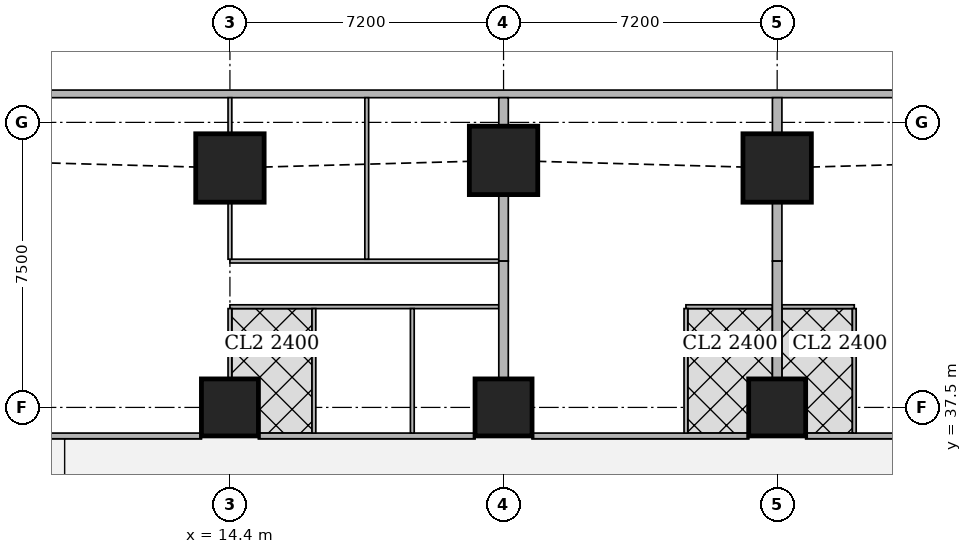
"""IFC4 building model, lengths in metres.
Left out: names, types, materials, properties, quantities, classifications, styles, units other than length and angle.
Written with IfcOpenShell. Run it as: python <this file> out.ifc"""

import sys

from ifc_helpers import new_model, si_unit, direction, frame, frame_2d, origin, origin_2d, place, context, subcontext, project, spatial, rectangle, extrude, element, fill, save


model = new_model("IFC4")
c1 = context("Model", 3, precision=1e-05, world=origin(), true_north=direction((0.0, 1.0)))
c2 = subcontext(c1, "Body", "Model", "MODEL_VIEW")
j1 = project(units=[si_unit("LENGTHUNIT", "METRE"), si_unit("PLANEANGLEUNIT", "RADIAN")], contexts=[c1])
p1 = place(None, origin())
s1 = spatial("IfcSite", under=j1, at=p1, CompositionType="ELEMENT")
p2 = place(p1, origin())
s2 = spatial("IfcBuilding", under=s1, at=p2, CompositionType="ELEMENT")
p3 = place(p2, frame((0.0, 0.0, 169.55)))
s3 = spatial("IfcBuildingStorey", under=s2, at=p3, CompositionType="ELEMENT", Elevation=169.55)
for number, where, z_axis, x_axis in (
    (1, (14.4, 37.5, 0.0), (0.0, 0.0, 1.0), (1.0, 0.0, 0.0)),
    (2, (21.6, 37.5, 0.0), (0.0, 0.0, 1.0), (1.0, 0.0, 0.0)),
    (3, (28.8, 37.5, 0.0), (0.0, 0.0, 1.0), (1.0, 0.0, 0.0)),
):
    element("IfcColumn", number, at=place(p3, frame(where, z_axis=z_axis, x_axis=x_axis)), inside=s3, PredefinedType="COLUMN", context=c2, shape_type="SweptSolid", body=[
        extrude(rectangle(XDim=1.5, YDim=1.5, at=origin_2d()), origin(), (0.0, 0.0, 1.0), 3.75),
    ])
for number, where, z_axis, x_axis in (
    (4, (14.4, 43.8, 0.0), (0.0, 0.0, 1.0), (1.0, 0.0, 0.0)),
    (5, (21.6, 44.0, 0.0), (0.0, 0.0, 1.0), (1.0, 0.0, 0.0)),
    (6, (28.8, 43.8, 0.0), (0.0, 0.0, 1.0), (1.0, 0.0, 0.0)),
):
    element("IfcColumn", number, at=place(p3, frame(where, z_axis=z_axis, x_axis=x_axis)), inside=s3, PredefinedType="COLUMN", context=c2, shape_type="SweptSolid", body=[
        extrude(rectangle(XDim=1.8, YDim=1.8, at=origin_2d()), origin(), (0.0, 0.0, 1.0), 3.75),
    ])
p4 = place(p3, frame((40.106, 45.75, 0.0), z_axis=(0.0, 0.0, 1.0), x_axis=(-1.0, 0.0, 0.0)))
e7 = element("IfcWall", 7, at=p4, inside=s3, PredefinedType="SOLIDWALL", context=c2, shape_type="SweptSolid", body=[
    extrude(rectangle(XDim=37.943, YDim=0.2, at=frame_2d((18.971, 0.0))), origin(), (0.0, 0.0, 1.0), 3.5),
])
p5 = place(p4, frame((8.606, 0.0, 0.9)))
e8 = element("IfcOpeningElement", 8, at=p5, cuts=e7, PredefinedType="OPENING", context=c2, shape_type="SweptSolid", body=[
    extrude(rectangle(XDim=1.8, YDim=1.5, at=frame_2d((0.9, 0.75))), frame((0.0, 0.11, 0.0), z_axis=(0.0, -1.0, 0.0), x_axis=(1.0, 0.0, 0.0)), (0.0, 0.0, 1.0), 0.22),
])
p6 = place(p4, frame((12.206, 0.0, 0.9)))
e9 = element("IfcOpeningElement", 9, at=p6, cuts=e7, PredefinedType="OPENING", context=c2, shape_type="SweptSolid", body=[
    extrude(rectangle(XDim=1.8, YDim=1.5, at=frame_2d((0.9, 0.75))), frame((0.0, 0.11, 0.0), z_axis=(0.0, -1.0, 0.0), x_axis=(1.0, 0.0, 0.0)), (0.0, 0.0, 1.0), 0.22),
])
p7 = place(p4, frame((15.806, 0.0, 0.9)))
e10 = element("IfcOpeningElement", 10, at=p7, cuts=e7, PredefinedType="OPENING", context=c2, shape_type="SweptSolid", body=[
    extrude(rectangle(XDim=1.8, YDim=1.5, at=frame_2d((0.9, 0.75))), frame((0.0, 0.11, 0.0), z_axis=(0.0, -1.0, 0.0), x_axis=(1.0, 0.0, 0.0)), (0.0, 0.0, 1.0), 0.22),
])
p8 = place(p4, frame((19.406, 0.0, 0.9)))
e11 = element("IfcOpeningElement", 11, at=p8, cuts=e7, PredefinedType="OPENING", context=c2, shape_type="SweptSolid", body=[
    extrude(rectangle(XDim=1.8, YDim=1.5, at=frame_2d((0.9, 0.75))), frame((0.0, 0.11, 0.0), z_axis=(0.0, -1.0, 0.0), x_axis=(1.0, 0.0, 0.0)), (0.0, 0.0, 1.0), 0.22),
])
p9 = place(p4, frame((23.006, 0.0, 0.9)))
e12 = element("IfcOpeningElement", 12, at=p9, cuts=e7, PredefinedType="OPENING", context=c2, shape_type="SweptSolid", body=[
    extrude(rectangle(XDim=1.8, YDim=1.5, at=frame_2d((0.9, 0.75))), frame((0.0, 0.11, 0.0), z_axis=(0.0, -1.0, 0.0), x_axis=(1.0, 0.0, 0.0)), (0.0, 0.0, 1.0), 0.22),
])
p10 = place(p4, frame((26.606, 0.0, 0.9)))
e13 = element("IfcOpeningElement", 13, at=p10, cuts=e7, PredefinedType="OPENING", context=c2, shape_type="SweptSolid", body=[
    extrude(rectangle(XDim=1.8, YDim=1.5, at=frame_2d((0.9, 0.75))), frame((0.0, 0.11, 0.0), z_axis=(0.0, -1.0, 0.0), x_axis=(1.0, 0.0, 0.0)), (0.0, 0.0, 1.0), 0.22),
])
p11 = place(p3, frame((8.1, 36.75, 0.0), z_axis=(0.0, 0.0, 1.0), x_axis=(1.0, 0.0, 0.0)))
e14 = element("IfcWall", 14, at=p11, inside=s3, PredefinedType="SOLIDWALL", context=c2, shape_type="SweptSolid", body=[
    extrude(rectangle(XDim=5.549, YDim=0.15, at=frame_2d((2.774, 0.0))), origin(), (0.0, 0.0, 1.0), 3.5),
])
p12 = place(p11, frame((2.725, 0.0, 0.0)))
e15 = element("IfcOpeningElement", 15, at=p12, cuts=e14, PredefinedType="OPENING", context=c2, shape_type="SweptSolid", body=[
    extrude(rectangle(XDim=1.0, YDim=2.1, at=frame_2d((0.5, 1.05))), frame((0.0, 0.085, 0.0), z_axis=(0.0, -1.0, 0.0), x_axis=(1.0, 0.0, 0.0)), (0.0, 0.0, 1.0), 0.17),
])
p13 = place(p3, frame((15.151, 36.75, 0.0), z_axis=(0.0, 0.0, 1.0), x_axis=(1.0, 0.0, 0.0)))
e16 = element("IfcWall", 16, at=p13, inside=s3, PredefinedType="SOLIDWALL", context=c2, shape_type="SweptSolid", body=[
    extrude(rectangle(XDim=5.698, YDim=0.15, at=frame_2d((2.849, 0.0))), origin(), (0.0, 0.0, 1.0), 3.5),
])
p14 = place(p3, frame((22.351, 36.75, 0.0), z_axis=(0.0, 0.0, 1.0), x_axis=(1.0, 0.0, 0.0)))
e17 = element("IfcWall", 17, at=p14, inside=s3, PredefinedType="SOLIDWALL", context=c2, shape_type="SweptSolid", body=[
    extrude(rectangle(XDim=5.698, YDim=0.15, at=frame_2d((2.849, 0.0))), origin(), (0.0, 0.0, 1.0), 3.5),
])
p15 = place(p14, frame((1.149, 0.0, 0.0)))
e18 = element("IfcOpeningElement", 18, at=p15, cuts=e17, PredefinedType="OPENING", context=c2, shape_type="SweptSolid", body=[
    extrude(rectangle(XDim=1.0, YDim=2.1, at=frame_2d((0.5, 1.05))), frame((0.0, 0.085, 0.0), z_axis=(0.0, -1.0, 0.0), x_axis=(1.0, 0.0, 0.0)), (0.0, 0.0, 1.0), 0.17),
])
p16 = place(p3, frame((29.551, 36.75, 0.0), z_axis=(0.0, 0.0, 1.0), x_axis=(1.0, 0.0, 0.0)))
e19 = element("IfcWall", 19, at=p16, inside=s3, PredefinedType="SOLIDWALL", context=c2, shape_type="SweptSolid", body=[
    extrude(rectangle(XDim=5.422, YDim=0.15, at=frame_2d((2.711, 0.0))), origin(), (0.0, 0.0, 1.0), 3.5),
])
p17 = place(p16, frame((2.895, 0.0, 0.0)))
e20 = element("IfcOpeningElement", 20, at=p17, cuts=e19, PredefinedType="OPENING", context=c2, shape_type="SweptSolid", body=[
    extrude(rectangle(XDim=1.0, YDim=2.1, at=frame_2d((0.5, 1.05))), frame((0.0, 0.085, 0.0), z_axis=(0.0, -1.0, 0.0), x_axis=(1.0, 0.0, 0.0)), (0.0, 0.0, 1.0), 0.17),
])
p18 = place(p3, frame((14.4, 41.35, 0.0), z_axis=(0.0, 0.0, 1.0), x_axis=(1.0, 0.0, 0.0)))
e21 = element("IfcWall", 21, at=p18, inside=s3, PredefinedType="PARTITIONING", context=c2, shape_type="SweptSolid", body=[
    extrude(rectangle(XDim=7.075, YDim=0.1, at=frame_2d((3.538, 0.0))), origin(), (0.0, 0.0, 1.0), 3.5),
])
p19 = place(p18, frame((0.2, 0.0, 0.0)))
e22 = element("IfcOpeningElement", 22, at=p19, cuts=e21, PredefinedType="OPENING", context=c2, shape_type="SweptSolid", body=[
    extrude(rectangle(XDim=0.9, YDim=2.1, at=frame_2d((0.45, 1.05))), frame((0.0, 0.06, 0.0), z_axis=(0.0, -1.0, 0.0), x_axis=(1.0, 0.0, 0.0)), (0.0, 0.0, 1.0), 0.12),
])
p20 = place(p18, frame((3.8, 0.0, 0.0)))
e23 = element("IfcOpeningElement", 23, at=p20, cuts=e21, PredefinedType="OPENING", context=c2, shape_type="SweptSolid", body=[
    extrude(rectangle(XDim=0.9, YDim=2.1, at=frame_2d((0.45, 1.05))), frame((0.0, 0.06, 0.0), z_axis=(0.0, -1.0, 0.0), x_axis=(1.0, 0.0, 0.0)), (0.0, 0.0, 1.0), 0.12),
])
p21 = place(p3, frame((14.4, 40.15, 0.0), z_axis=(0.0, 0.0, 1.0), x_axis=(1.0, 0.0, 0.0)))
e24 = element("IfcWall", 24, at=p21, inside=s3, PredefinedType="PARTITIONING", context=c2, shape_type="SweptSolid", body=[
    extrude(rectangle(XDim=7.075, YDim=0.1, at=frame_2d((3.538, 0.0))), origin(), (0.0, 0.0, 1.0), 3.5),
])
p22 = place(p21, frame((0.655, 0.0, 0.0)))
e25 = element("IfcOpeningElement", 25, at=p22, cuts=e24, PredefinedType="OPENING", context=c2, shape_type="SweptSolid", body=[
    extrude(rectangle(XDim=0.9, YDim=2.1, at=frame_2d((0.45, 1.05))), frame((0.0, 0.06, 0.0), z_axis=(0.0, -1.0, 0.0), x_axis=(1.0, 0.0, 0.0)), (0.0, 0.0, 1.0), 0.12),
])
p23 = place(p21, frame((5.55, 0.0, 0.0)))
e26 = element("IfcOpeningElement", 26, at=p23, cuts=e24, PredefinedType="OPENING", context=c2, shape_type="SweptSolid", body=[
    extrude(rectangle(XDim=0.9, YDim=2.1, at=frame_2d((0.45, 1.05))), frame((0.0, 0.06, 0.0), z_axis=(0.0, -1.0, 0.0), x_axis=(1.0, 0.0, 0.0)), (0.0, 0.0, 1.0), 0.12),
])
p24 = place(p21, frame((3.054, 0.0, 0.0)))
e27 = element("IfcOpeningElement", 27, at=p24, cuts=e24, PredefinedType="OPENING", context=c2, shape_type="SweptSolid", body=[
    extrude(rectangle(XDim=0.9, YDim=2.1, at=frame_2d((0.45, 1.05))), frame((0.0, 0.06, 0.0), z_axis=(0.0, -1.0, 0.0), x_axis=(1.0, 0.0, 0.0)), (0.0, 0.0, 1.0), 0.12),
])
p25 = place(p3, frame((14.4, 41.4, 0.0), z_axis=(0.0, 0.0, 1.0), x_axis=(0.0, 1.0, 0.0)))
e28 = element("IfcWall", 28, at=p25, inside=s3, PredefinedType="PARTITIONING", context=c2, shape_type="SweptSolid", body=[
    extrude(rectangle(XDim=1.499, YDim=0.1, at=frame_2d((0.75, 0.0))), origin(), (0.0, 0.0, 1.0), 3.5),
])
p26 = place(p3, frame((14.4, 44.701, 0.0), z_axis=(0.0, 0.0, 1.0), x_axis=(0.0, 1.0, 0.0)))
e29 = element("IfcWall", 29, at=p26, inside=s3, PredefinedType="PARTITIONING", context=c2, shape_type="SweptSolid", body=[
    extrude(rectangle(XDim=0.949, YDim=0.1, at=frame_2d((0.475, 0.0))), origin(), (0.0, 0.0, 1.0), 3.5),
])
p27 = place(p3, frame((18.0, 41.4, 0.0), z_axis=(0.0, 0.0, 1.0), x_axis=(0.0, 1.0, 0.0)))
e30 = element("IfcWall", 30, at=p27, inside=s3, PredefinedType="PARTITIONING", context=c2, shape_type="SweptSolid", body=[
    extrude(rectangle(XDim=4.25, YDim=0.1, at=frame_2d((2.125, 0.0))), origin(), (0.0, 0.0, 1.0), 2.1),
])
p28 = place(p3, frame((14.4, 38.251, 0.0), z_axis=(0.0, 0.0, 1.0), x_axis=(0.0, 1.0, 0.0)))
e31 = element("IfcWall", 31, at=p28, inside=s3, PredefinedType="PARTITIONING", context=c2, shape_type="SweptSolid", body=[
    extrude(rectangle(XDim=1.849, YDim=0.1, at=frame_2d((0.925, 0.0))), origin(), (0.0, 0.0, 1.0), 3.5),
])
for number, where, z_axis, x_axis in (
    (32, (19.199, 36.825, 0.0), (0.0, 0.0, 1.0), (0.0, 1.0, 0.0)),
    (33, (16.61, 36.825, 0.0), (0.0, 0.0, 1.0), (0.0, 1.0, 0.0)),
):
    element("IfcWall", number, at=place(p3, frame(where, z_axis=z_axis, x_axis=x_axis)), inside=s3, PredefinedType="PARTITIONING", context=c2, shape_type="SweptSolid", body=[
        extrude(rectangle(XDim=3.275, YDim=0.1, at=frame_2d((1.638, 0.0))), origin(), (0.0, 0.0, 1.0), 3.5),
    ])
p29 = place(p3, frame((26.399, 40.15, 0.0), z_axis=(0.0, 0.0, 1.0), x_axis=(1.0, 0.0, 0.0)))
e34 = element("IfcWall", 34, at=p29, inside=s3, PredefinedType="PARTITIONING", context=c2, shape_type="SweptSolid", body=[
    extrude(rectangle(XDim=2.276, YDim=0.1, at=frame_2d((1.138, 0.0))), origin(), (0.0, 0.0, 1.0), 3.5),
])
p30 = place(p29, frame((0.75, 0.0, 0.0)))
e35 = element("IfcOpeningElement", 35, at=p30, cuts=e34, PredefinedType="OPENING", context=c2, shape_type="SweptSolid", body=[
    extrude(rectangle(XDim=0.9, YDim=2.1, at=frame_2d((0.45, 1.05))), frame((0.0, 0.06, 0.0), z_axis=(0.0, -1.0, 0.0), x_axis=(1.0, 0.0, 0.0)), (0.0, 0.0, 1.0), 0.12),
])
p31 = place(p3, frame((26.399, 36.825, 0.0), z_axis=(0.0, 0.0, 1.0), x_axis=(0.0, 1.0, 0.0)))
e36 = element("IfcWall", 36, at=p31, inside=s3, PredefinedType="PARTITIONING", context=c2, shape_type="SweptSolid", body=[
    extrude(rectangle(XDim=3.275, YDim=0.1, at=frame_2d((1.638, 0.0))), origin(), (0.0, 0.0, 1.0), 3.5),
])
p32 = place(p3, frame((21.6, 41.35, 0.0), z_axis=(0.0, 0.0, 1.0), x_axis=(0.0, 1.0, 0.0)))
e37 = element("IfcWall", 37, at=p32, inside=s3, PredefinedType="SOLIDWALL", context=c2, shape_type="SweptSolid", body=[
    extrude(rectangle(XDim=1.749, YDim=0.25, at=frame_2d((0.875, 0.0))), origin(), (0.0, 0.0, 1.0), 2.1),
])
p33 = place(p3, frame((21.6, 44.901, 0.0), z_axis=(0.0, 0.0, 1.0), x_axis=(0.0, 1.0, 0.0)))
e38 = element("IfcWall", 38, at=p33, inside=s3, PredefinedType="SOLIDWALL", context=c2, shape_type="SweptSolid", body=[
    extrude(rectangle(XDim=0.749, YDim=0.25, at=frame_2d((0.375, 0.0))), origin(), (0.0, 0.0, 1.0), 2.1),
])
p34 = place(p3, frame((21.6, 38.251, 0.0), z_axis=(0.0, 0.0, 1.0), x_axis=(0.0, 1.0, 0.0)))
e39 = element("IfcWall", 39, at=p34, inside=s3, PredefinedType="SOLIDWALL", context=c2, shape_type="SweptSolid", body=[
    extrude(rectangle(XDim=3.099, YDim=0.25, at=frame_2d((1.55, 0.0))), origin(), (0.0, 0.0, 1.0), 3.5),
])
p35 = place(p3, frame((28.925, 40.15, 0.0), z_axis=(0.0, 0.0, 1.0), x_axis=(1.0, 0.0, 0.0)))
e40 = element("IfcWall", 40, at=p35, inside=s3, PredefinedType="PARTITIONING", context=c2, shape_type="SweptSolid", body=[
    extrude(rectangle(XDim=1.904, YDim=0.1, at=frame_2d((0.952, 0.0))), origin(), (0.0, 0.0, 1.0), 3.5),
])
p36 = place(p35, frame((0.425, 0.0, 0.0)))
e41 = element("IfcOpeningElement", 41, at=p36, cuts=e40, PredefinedType="OPENING", context=c2, shape_type="SweptSolid", body=[
    extrude(rectangle(XDim=0.9, YDim=2.1, at=frame_2d((0.45, 1.05))), frame((0.0, 0.06, 0.0), z_axis=(0.0, -1.0, 0.0), x_axis=(1.0, 0.0, 0.0)), (0.0, 0.0, 1.0), 0.12),
])
p37 = place(p3, frame((30.829, 36.825, 0.0), z_axis=(0.0, 0.0, 1.0), x_axis=(0.0, 1.0, 0.0)))
e42 = element("IfcWall", 42, at=p37, inside=s3, PredefinedType="PARTITIONING", context=c2, shape_type="SweptSolid", body=[
    extrude(rectangle(XDim=3.275, YDim=0.1, at=frame_2d((1.638, 0.0))), origin(), (0.0, 0.0, 1.0), 3.5),
])
p38 = place(p3, frame((28.8, 41.35, 0.0), z_axis=(0.0, 0.0, 1.0), x_axis=(0.0, 1.0, 0.0)))
e43 = element("IfcWall", 43, at=p38, inside=s3, PredefinedType="SOLIDWALL", context=c2, shape_type="SweptSolid", body=[
    extrude(rectangle(XDim=1.549, YDim=0.25, at=frame_2d((0.774, 0.0))), origin(), (0.0, 0.0, 1.0), 2.1),
])
p39 = place(p3, frame((28.8, 44.701, 0.0), z_axis=(0.0, 0.0, 1.0), x_axis=(0.0, 1.0, 0.0)))
e44 = element("IfcWall", 44, at=p39, inside=s3, PredefinedType="SOLIDWALL", context=c2, shape_type="SweptSolid", body=[
    extrude(rectangle(XDim=0.949, YDim=0.25, at=frame_2d((0.475, 0.0))), origin(), (0.0, 0.0, 1.0), 2.1),
])
p40 = place(p3, frame((28.8, 38.251, 0.0), z_axis=(0.0, 0.0, 1.0), x_axis=(0.0, 1.0, 0.0)))
e45 = element("IfcWall", 45, at=p40, inside=s3, PredefinedType="SOLIDWALL", context=c2, shape_type="SweptSolid", body=[
    extrude(rectangle(XDim=3.099, YDim=0.25, at=frame_2d((1.55, 0.0))), origin(), (0.0, 0.0, 1.0), 3.5),
])
p41 = place(p5, origin())
e46 = element("IfcWindow", 46, at=p41, inside=s3, PartitioningType="SINGLE_PANEL", PredefinedType="WINDOW", context=c2, shape_type="SweptSolid", body=[
    extrude(rectangle(XDim=1.8, YDim=1.5, at=frame_2d((0.9, 0.75))), frame((0.0, 0.03, 0.0), z_axis=(0.0, -1.0, 0.0), x_axis=(1.0, 0.0, 0.0)), (0.0, 0.0, 1.0), 0.06),
])
fill(e8, e46)
p42 = place(p6, origin())
e47 = element("IfcWindow", 47, at=p42, inside=s3, PartitioningType="SINGLE_PANEL", PredefinedType="WINDOW", context=c2, shape_type="SweptSolid", body=[
    extrude(rectangle(XDim=1.8, YDim=1.5, at=frame_2d((0.9, 0.75))), frame((0.0, 0.03, 0.0), z_axis=(0.0, -1.0, 0.0), x_axis=(1.0, 0.0, 0.0)), (0.0, 0.0, 1.0), 0.06),
])
fill(e9, e47)
p43 = place(p7, origin())
e48 = element("IfcWindow", 48, at=p43, inside=s3, PartitioningType="SINGLE_PANEL", PredefinedType="WINDOW", context=c2, shape_type="SweptSolid", body=[
    extrude(rectangle(XDim=1.8, YDim=1.5, at=frame_2d((0.9, 0.75))), frame((0.0, 0.03, 0.0), z_axis=(0.0, -1.0, 0.0), x_axis=(1.0, 0.0, 0.0)), (0.0, 0.0, 1.0), 0.06),
])
fill(e10, e48)
p44 = place(p8, origin())
e49 = element("IfcWindow", 49, at=p44, inside=s3, PartitioningType="SINGLE_PANEL", PredefinedType="WINDOW", context=c2, shape_type="SweptSolid", body=[
    extrude(rectangle(XDim=1.8, YDim=1.5, at=frame_2d((0.9, 0.75))), frame((0.0, 0.03, 0.0), z_axis=(0.0, -1.0, 0.0), x_axis=(1.0, 0.0, 0.0)), (0.0, 0.0, 1.0), 0.06),
])
fill(e11, e49)
p45 = place(p9, origin())
e50 = element("IfcWindow", 50, at=p45, inside=s3, PartitioningType="SINGLE_PANEL", PredefinedType="WINDOW", context=c2, shape_type="SweptSolid", body=[
    extrude(rectangle(XDim=1.8, YDim=1.5, at=frame_2d((0.9, 0.75))), frame((0.0, 0.03, 0.0), z_axis=(0.0, -1.0, 0.0), x_axis=(1.0, 0.0, 0.0)), (0.0, 0.0, 1.0), 0.06),
])
fill(e12, e50)
p46 = place(p10, origin())
e51 = element("IfcWindow", 51, at=p46, inside=s3, PartitioningType="SINGLE_PANEL", PredefinedType="WINDOW", context=c2, shape_type="SweptSolid", body=[
    extrude(rectangle(XDim=1.8, YDim=1.5, at=frame_2d((0.9, 0.75))), frame((0.0, 0.03, 0.0), z_axis=(0.0, -1.0, 0.0), x_axis=(1.0, 0.0, 0.0)), (0.0, 0.0, 1.0), 0.06),
])
fill(e13, e51)
p47 = place(p19, origin())
e52 = element("IfcDoor", 52, at=p47, inside=s3, OperationType="SINGLE_SWING_LEFT", PredefinedType="DOOR", context=c2, shape_type="SweptSolid", body=[
    extrude(rectangle(XDim=0.9, YDim=2.1, at=frame_2d((0.45, 1.05))), frame((0.0, 0.025, 0.0), z_axis=(0.0, -1.0, 0.0), x_axis=(1.0, 0.0, 0.0)), (0.0, 0.0, 1.0), 0.05),
])
fill(e22, e52)
p48 = place(p20, origin())
e53 = element("IfcDoor", 53, at=p48, inside=s3, OperationType="SINGLE_SWING_LEFT", PredefinedType="DOOR", context=c2, shape_type="SweptSolid", body=[
    extrude(rectangle(XDim=0.9, YDim=2.1, at=frame_2d((0.45, 1.05))), frame((0.0, 0.025, 0.0), z_axis=(0.0, -1.0, 0.0), x_axis=(1.0, 0.0, 0.0)), (0.0, 0.0, 1.0), 0.05),
])
fill(e23, e53)
p49 = place(p22, origin())
e54 = element("IfcDoor", 54, at=p49, inside=s3, OperationType="SINGLE_SWING_RIGHT", PredefinedType="DOOR", context=c2, shape_type="SweptSolid", body=[
    extrude(rectangle(XDim=0.9, YDim=2.1, at=frame_2d((0.45, 1.05))), frame((0.0, 0.025, 0.0), z_axis=(0.0, -1.0, 0.0), x_axis=(1.0, 0.0, 0.0)), (0.0, 0.0, 1.0), 0.05),
])
fill(e25, e54)
p50 = place(p23, origin())
e55 = element("IfcDoor", 55, at=p50, inside=s3, OperationType="SINGLE_SWING_LEFT", PredefinedType="DOOR", context=c2, shape_type="SweptSolid", body=[
    extrude(rectangle(XDim=0.9, YDim=2.1, at=frame_2d((0.45, 1.05))), frame((0.0, 0.025, 0.0), z_axis=(0.0, -1.0, 0.0), x_axis=(1.0, 0.0, 0.0)), (0.0, 0.0, 1.0), 0.05),
])
fill(e26, e55)
p51 = place(p24, origin())
e56 = element("IfcDoor", 56, at=p51, inside=s3, OperationType="SINGLE_SWING_LEFT", PredefinedType="DOOR", context=c2, shape_type="SweptSolid", body=[
    extrude(rectangle(XDim=0.9, YDim=2.1, at=frame_2d((0.45, 1.05))), frame((0.0, 0.025, 0.0), z_axis=(0.0, -1.0, 0.0), x_axis=(1.0, 0.0, 0.0)), (0.0, 0.0, 1.0), 0.05),
])
fill(e27, e56)
p52 = place(p12, origin())
e57 = element("IfcDoor", 57, at=p52, inside=s3, OperationType="SINGLE_SWING_LEFT", PredefinedType="DOOR", context=c2, shape_type="SweptSolid", body=[
    extrude(rectangle(XDim=1.0, YDim=2.1, at=frame_2d((0.5, 1.05))), frame((0.0, 0.025, 0.0), z_axis=(0.0, -1.0, 0.0), x_axis=(1.0, 0.0, 0.0)), (0.0, 0.0, 1.0), 0.05),
])
fill(e15, e57)
p53 = place(p30, origin())
e58 = element("IfcDoor", 58, at=p53, inside=s3, OperationType="SINGLE_SWING_LEFT", PredefinedType="DOOR", context=c2, shape_type="SweptSolid", body=[
    extrude(rectangle(XDim=0.9, YDim=2.1, at=frame_2d((0.45, 1.05))), frame((0.0, 0.025, 0.0), z_axis=(0.0, -1.0, 0.0), x_axis=(1.0, 0.0, 0.0)), (0.0, 0.0, 1.0), 0.05),
])
fill(e35, e58)
p54 = place(p15, origin())
e59 = element("IfcDoor", 59, at=p54, inside=s3, OperationType="SINGLE_SWING_LEFT", PredefinedType="DOOR", context=c2, shape_type="SweptSolid", body=[
    extrude(rectangle(XDim=1.0, YDim=2.1, at=frame_2d((0.5, 1.05))), frame((0.0, 0.025, 0.0), z_axis=(0.0, -1.0, 0.0), x_axis=(1.0, 0.0, 0.0)), (0.0, 0.0, 1.0), 0.05),
])
fill(e18, e59)
p55 = place(p36, origin())
e60 = element("IfcDoor", 60, at=p55, inside=s3, OperationType="SINGLE_SWING_RIGHT", PredefinedType="DOOR", context=c2, shape_type="SweptSolid", body=[
    extrude(rectangle(XDim=0.9, YDim=2.1, at=frame_2d((0.45, 1.05))), frame((0.0, 0.025, 0.0), z_axis=(0.0, -1.0, 0.0), x_axis=(1.0, 0.0, 0.0)), (0.0, 0.0, 1.0), 0.05),
])
fill(e41, e60)
save(model, sys.argv[1])
